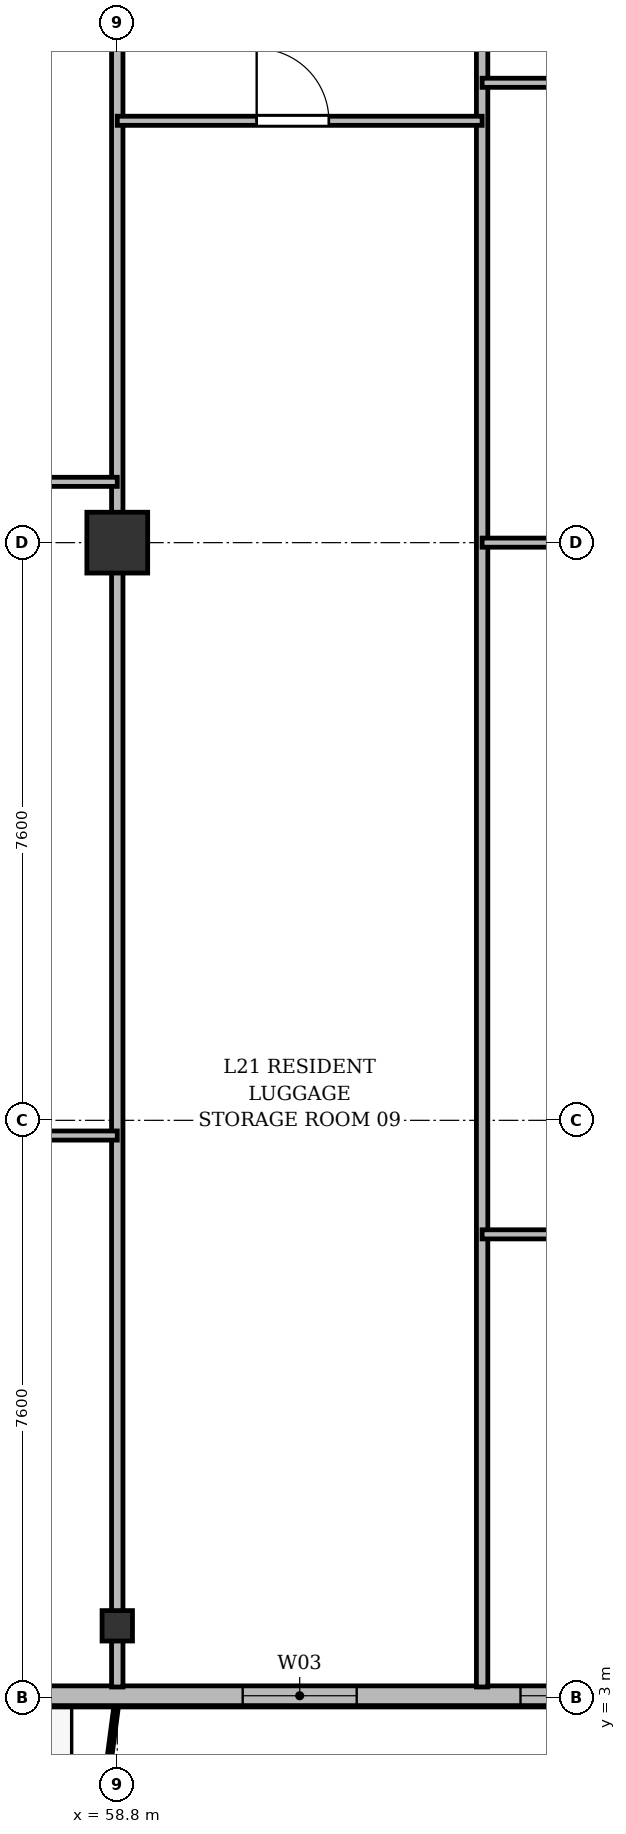
"""IFC4 building model, lengths in metres.
Left out: names, types, materials, properties, quantities, classifications, styles, units other than length and angle.
Written with IfcOpenShell. Run it as: python <this file> out.ifc"""

import sys

from ifc_helpers import new_model, si_unit, direction, frame, frame_2d, origin, origin_2d, place, context, subcontext, project, spatial, rectangle, i_section, extrude, source, transform, mapped, element, fill, save


model = new_model("IFC4")
c1 = context("Model", 3, precision=1e-05, world=origin(), true_north=direction((0.0, 1.0)))
c2 = subcontext(c1, "Body", "Model", "MODEL_VIEW")
j1 = project(units=[si_unit("LENGTHUNIT", "METRE"), si_unit("PLANEANGLEUNIT", "RADIAN")], contexts=[c1])
p1 = place(None, origin())
s1 = spatial("IfcSite", under=j1, at=p1, CompositionType="ELEMENT")
p2 = place(p1, origin())
s2 = spatial("IfcBuilding", under=s1, at=p2, CompositionType="ELEMENT")
p3 = place(p2, frame((0.0, 0.0, 85.3)))
s3 = spatial("IfcBuildingStorey", under=s2, at=p3, CompositionType="ELEMENT", Elevation=85.3)
m1 = source(origin(), c2, "Body", "SweptSolid", [
    extrude(i_section(OverallWidth=0.4, OverallDepth=0.4, WebThickness=0.022, FlangeThickness=0.035, at=origin_2d()), origin(), (0.0, 0.0, 1.0), 3.6),
])
p4 = place(p3, frame((58.8, 3.95, 0.0), z_axis=(0.0, 0.0, 1.0), x_axis=(1.0, 0.0, 0.0)))
e1 = element("IfcColumn", 1, at=p4, inside=s3, PredefinedType="COLUMN", context=c2, shape_type="MappedRepresentation", body=[
    mapped(m1, transform((0.0, 0.0, 0.0), x_axis=(1.0, 0.0, 0.0), y_axis=(0.0, 1.0, 0.0), z_axis=(0.0, 0.0, 1.0), scale=1.0)),
])
m2 = source(origin(), c2, "Body", "SweptSolid", [
    extrude(rectangle(XDim=0.8, YDim=0.8, at=origin_2d()), origin(), (0.0, 0.0, 1.0), 3.6),
])
p5 = place(p3, frame((58.8, 18.2, 0.0), z_axis=(0.0, 0.0, 1.0), x_axis=(1.0, 0.0, 0.0)))
e2 = element("IfcColumn", 2, at=p5, inside=s3, PredefinedType="COLUMN", context=c2, shape_type="MappedRepresentation", body=[
    mapped(m2, transform((0.0, 0.0, 0.0), x_axis=(1.0, 0.0, 0.0), y_axis=(0.0, 1.0, 0.0), z_axis=(0.0, 0.0, 1.0), scale=1.0)),
])
p6 = place(p3, frame((66.9, 3.03, 0.0), z_axis=(0.0, 0.0, 1.0), x_axis=(-1.0, 0.0, 0.0)))
e3 = element("IfcWall", 3, at=p6, inside=s3, PredefinedType="SOLIDWALL", context=c2, shape_type="SweptSolid", body=[
    extrude(rectangle(XDim=59.4, YDim=0.26, at=frame_2d((29.7, 0.0))), origin(), (0.0, 0.0, 1.0), 3.34),
])
p7 = place(p6, frame((0.595, 0.0, 0.9)))
e4 = element("IfcOpeningElement", 4, at=p7, cuts=e3, PredefinedType="OPENING", context=c2, shape_type="SweptSolid", body=[
    extrude(rectangle(XDim=2.2, YDim=1.8, at=frame_2d((1.1, 0.9))), frame((0.0, 0.14, 0.0), z_axis=(0.0, -1.0, 0.0), x_axis=(1.0, 0.0, 0.0)), (0.0, 0.0, 1.0), 0.28),
])
p8 = place(p6, frame((4.95, 0.0, 0.9)))
e5 = element("IfcOpeningElement", 5, at=p8, cuts=e3, PredefinedType="OPENING", context=c2, shape_type="SweptSolid", body=[
    extrude(rectangle(XDim=1.5, YDim=1.75, at=frame_2d((0.75, 0.875))), frame((0.0, 0.14, 0.0), z_axis=(0.0, -1.0, 0.0), x_axis=(1.0, 0.0, 0.0)), (0.0, 0.0, 1.0), 0.28),
])
p9 = place(p6, frame((9.18, 0.0, 0.0)))
e6 = element("IfcOpeningElement", 6, at=p9, cuts=e3, PredefinedType="OPENING", context=c2, shape_type="SweptSolid", body=[
    extrude(rectangle(XDim=1.2, YDim=2.2, at=frame_2d((0.6, 1.1))), frame((0.0, 0.14, 0.0), z_axis=(0.0, -1.0, 0.0), x_axis=(1.0, 0.0, 0.0)), (0.0, 0.0, 1.0), 0.28),
])
p10 = place(p6, frame((13.125, 0.0, 0.9)))
e7 = element("IfcOpeningElement", 7, at=p10, cuts=e3, PredefinedType="OPENING", context=c2, shape_type="SweptSolid", body=[
    extrude(rectangle(XDim=1.65, YDim=1.85, at=frame_2d((0.825, 0.925))), frame((0.0, 0.14, 0.0), z_axis=(0.0, -1.0, 0.0), x_axis=(1.0, 0.0, 0.0)), (0.0, 0.0, 1.0), 0.28),
])
p11 = place(p6, frame((16.2, 0.0, 0.9)))
e8 = element("IfcOpeningElement", 8, at=p11, cuts=e3, PredefinedType="OPENING", context=c2, shape_type="SweptSolid", body=[
    extrude(rectangle(XDim=1.8, YDim=1.8, at=frame_2d((0.9, 0.9))), frame((0.0, 0.14, 0.0), z_axis=(0.0, -1.0, 0.0), x_axis=(1.0, 0.0, 0.0)), (0.0, 0.0, 1.0), 0.28),
])
p12 = place(p6, frame((18.75, 0.0, 0.9)))
e9 = element("IfcOpeningElement", 9, at=p12, cuts=e3, PredefinedType="OPENING", context=c2, shape_type="SweptSolid", body=[
    extrude(rectangle(XDim=1.5, YDim=1.75, at=frame_2d((0.75, 0.875))), frame((0.0, 0.14, 0.0), z_axis=(0.0, -1.0, 0.0), x_axis=(1.0, 0.0, 0.0)), (0.0, 0.0, 1.0), 0.28),
])
p13 = place(p6, frame((21.15, 0.0, 0.9)))
e10 = element("IfcOpeningElement", 10, at=p13, cuts=e3, PredefinedType="OPENING", context=c2, shape_type="SweptSolid", body=[
    extrude(rectangle(XDim=1.5, YDim=1.75, at=frame_2d((0.75, 0.875))), frame((0.0, 0.14, 0.0), z_axis=(0.0, -1.0, 0.0), x_axis=(1.0, 0.0, 0.0)), (0.0, 0.0, 1.0), 0.28),
])
p14 = place(p6, frame((23.85, 0.0, 0.9)))
e11 = element("IfcOpeningElement", 11, at=p14, cuts=e3, PredefinedType="OPENING", context=c2, shape_type="SweptSolid", body=[
    extrude(rectangle(XDim=2.0, YDim=1.95, at=frame_2d((1.0, 0.975))), frame((0.0, 0.14, 0.0), z_axis=(0.0, -1.0, 0.0), x_axis=(1.0, 0.0, 0.0)), (0.0, 0.0, 1.0), 0.28),
])
p15 = place(p6, frame((27.525, 0.0, 0.9)))
e12 = element("IfcOpeningElement", 12, at=p15, cuts=e3, PredefinedType="OPENING", context=c2, shape_type="SweptSolid", body=[
    extrude(rectangle(XDim=1.65, YDim=1.85, at=frame_2d((0.825, 0.925))), frame((0.0, 0.14, 0.0), z_axis=(0.0, -1.0, 0.0), x_axis=(1.0, 0.0, 0.0)), (0.0, 0.0, 1.0), 0.28),
])
p16 = place(p6, frame((32.3, 0.0, 0.9)))
e13 = element("IfcOpeningElement", 13, at=p16, cuts=e3, PredefinedType="OPENING", context=c2, shape_type="SweptSolid", body=[
    extrude(rectangle(XDim=1.8, YDim=1.8, at=frame_2d((0.9, 0.9))), frame((0.0, 0.14, 0.0), z_axis=(0.0, -1.0, 0.0), x_axis=(1.0, 0.0, 0.0)), (0.0, 0.0, 1.0), 0.28),
])
p17 = place(p6, frame((40.301, 0.0, 0.0)))
e14 = element("IfcOpeningElement", 14, at=p17, cuts=e3, PredefinedType="OPENING", context=c2, shape_type="SweptSolid", body=[
    extrude(rectangle(XDim=1.2, YDim=2.2, at=frame_2d((0.6, 1.1))), frame((0.0, 0.14, 0.0), z_axis=(0.0, -1.0, 0.0), x_axis=(1.0, 0.0, 0.0)), (0.0, 0.0, 1.0), 0.28),
])
p18 = place(p6, frame((46.65, 0.0, 0.9)))
e15 = element("IfcOpeningElement", 15, at=p18, cuts=e3, PredefinedType="OPENING", context=c2, shape_type="SweptSolid", body=[
    extrude(rectangle(XDim=1.5, YDim=1.75, at=frame_2d((0.75, 0.875))), frame((0.0, 0.14, 0.0), z_axis=(0.0, -1.0, 0.0), x_axis=(1.0, 0.0, 0.0)), (0.0, 0.0, 1.0), 0.28),
])
p19 = place(p6, frame((54.558, 0.0, 0.0)))
e16 = element("IfcOpeningElement", 16, at=p19, cuts=e3, PredefinedType="OPENING", context=c2, shape_type="SweptSolid", body=[
    extrude(rectangle(XDim=1.2, YDim=2.2, at=frame_2d((0.6, 1.1))), frame((0.0, 0.14, 0.0), z_axis=(0.0, -1.0, 0.0), x_axis=(1.0, 0.0, 0.0)), (0.0, 0.0, 1.0), 0.28),
])
p20 = place(p6, frame((56.98, 0.0, 0.9)))
e17 = element("IfcOpeningElement", 17, at=p20, cuts=e3, PredefinedType="OPENING", context=c2, shape_type="SweptSolid", body=[
    extrude(rectangle(XDim=1.65, YDim=1.85, at=frame_2d((0.825, 0.925))), frame((0.0, 0.14, 0.0), z_axis=(0.0, -1.0, 0.0), x_axis=(1.0, 0.0, 0.0)), (0.0, 0.0, 1.0), 0.28),
])
p21 = place(p3, frame((58.8, 3.145, 0.0), z_axis=(0.0, 0.0, 1.0), x_axis=(0.0, 1.0, 0.0)))
e18 = element("IfcWall", 18, at=p21, inside=s3, PredefinedType="PARTITIONING", context=c2, shape_type="SweptSolid", body=[
    extrude(rectangle(XDim=24.455, YDim=0.15, at=frame_2d((12.228, 0.0))), origin(), (0.0, 0.0, 1.0), 2.84),
])
p22 = place(p3, frame((63.6, 3.145, 0.0), z_axis=(0.0, 0.0, 1.0), x_axis=(0.0, 1.0, 0.0)))
e19 = element("IfcWall", 19, at=p22, inside=s3, PredefinedType="PARTITIONING", context=c2, shape_type="SweptSolid", body=[
    extrude(rectangle(XDim=24.455, YDim=0.15, at=frame_2d((12.228, 0.0))), origin(), (0.0, 0.0, 1.0), 2.752),
])
p23 = place(p3, frame((51.0, 19.0, 0.0), z_axis=(0.0, 0.0, 1.0), x_axis=(1.0, 0.0, 0.0)))
e20 = element("IfcWall", 20, at=p23, inside=s3, PredefinedType="PARTITIONING", context=c2, shape_type="SweptSolid", body=[
    extrude(rectangle(XDim=7.8, YDim=0.12, at=frame_2d((3.9, 0.0))), origin(), (0.0, 0.0, 1.0), 2.84),
])
p24 = place(p23, frame((3.333, 0.0, 0.0)))
e21 = element("IfcOpeningElement", 21, at=p24, cuts=e20, PredefinedType="OPENING", context=c2, shape_type="SweptSolid", body=[
    extrude(rectangle(XDim=0.95, YDim=2.15, at=frame_2d((0.475, 1.075))), frame((0.0, 0.07, 0.0), z_axis=(0.0, -1.0, 0.0), x_axis=(1.0, 0.0, 0.0)), (0.0, 0.0, 1.0), 0.14),
])
p25 = place(p3, frame((54.9, 10.4, 0.0), z_axis=(0.0, 0.0, 1.0), x_axis=(1.0, 0.0, 0.0)))
e22 = element("IfcWall", 22, at=p25, inside=s3, PredefinedType="PARTITIONING", context=c2, shape_type="SweptSolid", body=[
    extrude(rectangle(XDim=3.9, YDim=0.12, at=frame_2d((1.95, 0.0))), origin(), (0.0, 0.0, 1.0), 2.84),
])
p26 = place(p25, frame((1.475, 0.0, 0.0)))
e23 = element("IfcOpeningElement", 23, at=p26, cuts=e22, PredefinedType="OPENING", context=c2, shape_type="SweptSolid", body=[
    extrude(rectangle(XDim=0.95, YDim=2.15, at=frame_2d((0.475, 1.075))), frame((0.0, 0.07, 0.0), z_axis=(0.0, -1.0, 0.0), x_axis=(1.0, 0.0, 0.0)), (0.0, 0.0, 1.0), 0.14),
])
p27 = place(p3, frame((58.8, 23.75, 0.0), z_axis=(0.0, 0.0, 1.0), x_axis=(1.0, 0.0, 0.0)))
e24 = element("IfcWall", 24, at=p27, inside=s3, PredefinedType="PARTITIONING", context=c2, shape_type="SweptSolid", body=[
    extrude(rectangle(XDim=4.8, YDim=0.12, at=frame_2d((2.4, 0.0))), origin(), (0.0, 0.0, 1.0), 2.84),
])
p28 = place(p27, frame((1.834, 0.0, 0.0)))
e25 = element("IfcOpeningElement", 25, at=p28, cuts=e24, PredefinedType="OPENING", context=c2, shape_type="SweptSolid", body=[
    extrude(rectangle(XDim=0.95, YDim=2.15, at=frame_2d((0.475, 1.075))), frame((0.0, 0.07, 0.0), z_axis=(0.0, -1.0, 0.0), x_axis=(1.0, 0.0, 0.0)), (0.0, 0.0, 1.0), 0.14),
])
p29 = place(p3, frame((63.6, 18.2, 0.0), z_axis=(0.0, 0.0, 1.0), x_axis=(1.0, 0.0, 0.0)))
e26 = element("IfcWall", 26, at=p29, inside=s3, PredefinedType="PARTITIONING", context=c2, shape_type="SweptSolid", body=[
    extrude(rectangle(XDim=6.04, YDim=0.12, at=frame_2d((3.02, 0.0))), origin(), (0.0, 0.0, 1.0), 2.752),
])
p30 = place(p29, frame((2.906, 0.0, 0.0)))
e27 = element("IfcOpeningElement", 27, at=p30, cuts=e26, PredefinedType="OPENING", context=c2, shape_type="SweptSolid", body=[
    extrude(rectangle(XDim=0.95, YDim=2.15, at=frame_2d((0.475, 1.075))), frame((0.0, 0.07, 0.0), z_axis=(0.0, -1.0, 0.0), x_axis=(1.0, 0.0, 0.0)), (0.0, 0.0, 1.0), 0.14),
])
p31 = place(p3, frame((63.6, 24.25, 0.0), z_axis=(0.0, 0.0, 1.0), x_axis=(1.0, 0.0, 0.0)))
e28 = element("IfcWall", 28, at=p31, inside=s3, PredefinedType="PARTITIONING", context=c2, shape_type="SweptSolid", body=[
    extrude(rectangle(XDim=2.104, YDim=0.12, at=frame_2d((1.052, 0.0))), origin(), (0.0, 0.0, 1.0), 2.84),
])
p32 = place(p3, frame((63.6, 9.1, 0.0), z_axis=(0.0, 0.0, 1.0), x_axis=(1.0, 0.0, 0.0)))
e29 = element("IfcWall", 29, at=p32, inside=s3, PredefinedType="PARTITIONING", context=c2, shape_type="SweptSolid", body=[
    extrude(rectangle(XDim=6.04, YDim=0.12, at=frame_2d((3.02, 0.0))), origin(), (0.0, 0.0, 1.0), 2.84),
])
p33 = place(p32, frame((2.545, 0.0, 0.0)))
e30 = element("IfcOpeningElement", 30, at=p33, cuts=e29, PredefinedType="OPENING", context=c2, shape_type="SweptSolid", body=[
    extrude(rectangle(XDim=0.95, YDim=2.15, at=frame_2d((0.475, 1.075))), frame((0.0, 0.07, 0.0), z_axis=(0.0, -1.0, 0.0), x_axis=(1.0, 0.0, 0.0)), (0.0, 0.0, 1.0), 0.14),
])
m3 = source(origin(), c2, "Body", "SweptSolid", [
    extrude(rectangle(XDim=2.2, YDim=1.8, at=frame_2d((1.1, 0.9))), frame((0.0, 0.03, 0.0), z_axis=(0.0, -1.0, 0.0), x_axis=(1.0, 0.0, 0.0)), (0.0, 0.0, 1.0), 0.06),
])
p34 = place(p7, origin())
e31 = element("IfcWindow", 31, at=p34, inside=s3, PartitioningType="SINGLE_PANEL", PredefinedType="WINDOW", context=c2, shape_type="MappedRepresentation", body=[
    mapped(m3, transform((0.0, 0.0, 0.0), x_axis=(1.0, 0.0, 0.0), y_axis=(0.0, 1.0, 0.0), z_axis=(0.0, 0.0, 1.0), scale=1.0)),
])
fill(e4, e31)
m4 = source(origin(), c2, "Body", "SweptSolid", [
    extrude(rectangle(XDim=1.5, YDim=1.75, at=frame_2d((0.75, 0.875))), frame((0.0, 0.03, 0.0), z_axis=(0.0, -1.0, 0.0), x_axis=(1.0, 0.0, 0.0)), (0.0, 0.0, 1.0), 0.06),
])
p35 = place(p8, origin())
e32 = element("IfcWindow", 32, at=p35, inside=s3, PartitioningType="SINGLE_PANEL", PredefinedType="WINDOW", context=c2, shape_type="MappedRepresentation", body=[
    mapped(m4, transform((0.0, 0.0, 0.0), x_axis=(1.0, 0.0, 0.0), y_axis=(0.0, 1.0, 0.0), z_axis=(0.0, 0.0, 1.0), scale=1.0)),
])
fill(e5, e32)
m5 = source(origin(), c2, "Body", "SweptSolid", [
    extrude(rectangle(XDim=0.95, YDim=2.15, at=frame_2d((0.475, 1.075))), frame((0.0, 0.025, 0.0), z_axis=(0.0, -1.0, 0.0), x_axis=(1.0, 0.0, 0.0)), (0.0, 0.0, 1.0), 0.05),
])
p36 = place(p28, origin())
e33 = element("IfcDoor", 33, at=p36, inside=s3, OperationType="SINGLE_SWING_LEFT", PredefinedType="DOOR", context=c2, shape_type="MappedRepresentation", body=[
    mapped(m5, transform((0.0, 0.0, 0.0), x_axis=(1.0, 0.0, 0.0), y_axis=(0.0, 1.0, 0.0), z_axis=(0.0, 0.0, 1.0), scale=1.0)),
])
fill(e25, e33)
save(model, sys.argv[1])
